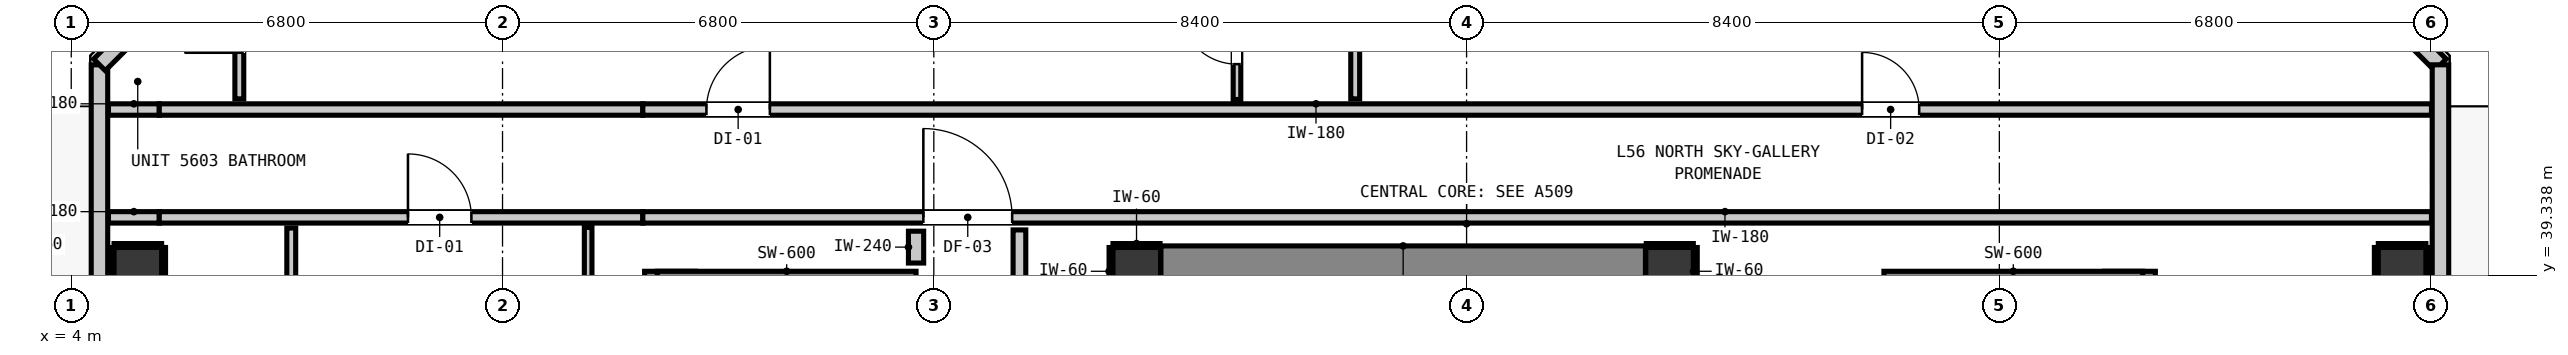
"""IFC4 building model, lengths in metres.
Left out: names, types, materials, properties, quantities, classifications, styles, units other than length and angle.
Written with IfcOpenShell. Run it as: python <this file> out.ifc"""

import sys

from ifc_helpers import new_model, si_unit, direction, frame, frame_2d, origin, origin_2d, place, context, subcontext, project, spatial, rectangle, extrude, element, fill, save


model = new_model("IFC4")
c1 = context("Model", 3, precision=1e-05, world=origin(), true_north=direction((0.0, 1.0)))
c2 = subcontext(c1, "Body", "Model", "MODEL_VIEW")
j1 = project(units=[si_unit("LENGTHUNIT", "METRE"), si_unit("PLANEANGLEUNIT", "RADIAN")], contexts=[c1])
p1 = place(None, origin())
s1 = spatial("IfcSite", under=j1, at=p1, CompositionType="ELEMENT")
p2 = place(p1, origin())
s2 = spatial("IfcBuilding", under=s1, at=p2, CompositionType="ELEMENT")
p3 = place(p2, frame((0.0, 0.0, 193.48)))
s3 = spatial("IfcBuildingStorey", under=s2, at=p3, CompositionType="ELEMENT", Elevation=193.48)
for number, where, z_axis, x_axis in (
    (1, (20.8, 39.4, 0.0), (0.0, 0.0, 1.0), (1.0, 0.0, 0.0)),
    (2, (29.2, 39.4, 0.0), (0.0, 0.0, 1.0), (1.0, 0.0, 0.0)),
):
    element("IfcColumn", number, at=place(p3, frame(where, z_axis=z_axis, x_axis=x_axis)), inside=s3, PredefinedType="COLUMN", context=c2, shape_type="SweptSolid", body=[
        extrude(rectangle(XDim=0.75, YDim=0.75, at=origin_2d()), origin(), (0.0, 0.0, 1.0), 3.32),
    ])
p4 = place(p3, frame((13.44, 31.08, 0.0), z_axis=(0.0, 0.0, 1.0), x_axis=(0.0, 1.0, 0.0)))
e3 = element("IfcWall", 3, at=p4, inside=s3, PredefinedType="SHEAR", context=c2, shape_type="SweptSolid", body=[
    extrude(rectangle(XDim=8.32, YDim=0.8, at=frame_2d((4.16, 0.0))), origin(), (0.0, 0.0, 1.0), 3.32),
])
p5 = place(p3, frame((13.24, 39.1, 0.0), z_axis=(0.0, 0.0, 1.0), x_axis=(1.0, 0.0, 0.0)))
e4 = element("IfcWall", 4, at=p5, inside=s3, PredefinedType="SHEAR", context=c2, shape_type="SweptSolid", body=[
    extrude(rectangle(XDim=4.08, YDim=0.6, at=frame_2d((2.04, 0.0))), origin(), (0.0, 0.0, 1.0), 3.32),
])
p6 = place(p3, frame((36.46, 31.08, 0.0), z_axis=(0.0, 0.0, 1.0), x_axis=(0.0, 1.0, 0.0)))
e5 = element("IfcWall", 5, at=p6, inside=s3, PredefinedType="SHEAR", context=c2, shape_type="SweptSolid", body=[
    extrude(rectangle(XDim=8.32, YDim=0.8, at=frame_2d((4.16, 0.0))), origin(), (0.0, 0.0, 1.0), 3.32),
])
p7 = place(p3, frame((32.58, 39.1, 0.0), z_axis=(0.0, 0.0, 1.0), x_axis=(1.0, 0.0, 0.0)))
e6 = element("IfcWall", 6, at=p7, inside=s3, PredefinedType="SHEAR", context=c2, shape_type="SweptSolid", body=[
    extrude(rectangle(XDim=4.08, YDim=0.6, at=frame_2d((2.04, 0.0))), origin(), (0.0, 0.0, 1.0), 3.32),
])
p8 = place(p3, frame((21.18, 39.4, 0.0), z_axis=(0.0, 0.0, 1.0), x_axis=(1.0, 0.0, 0.0)))
e7 = element("IfcWall", 7, at=p8, inside=s3, PredefinedType="SHEAR", context=c2, shape_type="SweptSolid", body=[
    extrude(rectangle(XDim=7.64, YDim=0.8, at=frame_2d((3.82, 0.0))), origin(), (0.0, 0.0, 1.0), 3.32),
])
for number, where, z_axis, x_axis in (
    (8, (5.05, 39.4, 0.0), (0.0, 0.0, 1.0), (1.0, 0.0, 0.0)),
    (9, (40.75, 39.4, 0.0), (0.0, 0.0, 1.0), (1.0, 0.0, 0.0)),
):
    element("IfcColumn", number, at=place(p3, frame(where, z_axis=z_axis, x_axis=x_axis)), inside=s3, PredefinedType="COLUMN", context=c2, shape_type="SweptSolid", body=[
        extrude(rectangle(XDim=0.75, YDim=0.75, at=origin_2d()), origin(), (0.0, 0.0, 1.0), 3.32),
    ])
p9 = place(p3, frame((4.445, 12.345, 0.0), z_axis=(0.0, 0.0, 1.0), x_axis=(0.0, 1.0, 0.0)))
e10 = element("IfcWall", 10, at=p9, inside=s3, PredefinedType="STANDARD", context=c2, shape_type="SweptSolid", body=[
    extrude(rectangle(XDim=30.31, YDim=0.26, at=frame_2d((15.155, 0.0))), origin(), (0.0, 0.0, 1.0), 3.1),
])
p10 = place(p9, frame((0.91, 0.0, 0.0)))
e11 = element("IfcOpeningElement", 11, at=p10, cuts=e10, PredefinedType="OPENING", context=c2, shape_type="SweptSolid", body=[
    extrude(rectangle(XDim=1.0, YDim=2.15, at=frame_2d((0.5, 1.075))), frame((0.0, 0.14, 0.0), z_axis=(0.0, -1.0, 0.0), x_axis=(1.0, 0.0, 0.0)), (0.0, 0.0, 1.0), 0.28),
])
p11 = place(p9, frame((2.322, 0.0, 0.85)))
e12 = element("IfcOpeningElement", 12, at=p11, cuts=e10, PredefinedType="OPENING", context=c2, shape_type="SweptSolid", body=[
    extrude(rectangle(XDim=0.58, YDim=1.5, at=frame_2d((0.29, 0.75))), frame((0.0, 0.14, 0.0), z_axis=(0.0, -1.0, 0.0), x_axis=(1.0, 0.0, 0.0)), (0.0, 0.0, 1.0), 0.28),
])
for number, where, z_axis, x_axis in (
    (13, (4.445, 42.655, 0.0), (0.0, 0.0, 1.0), (0.707, 0.707, 0.0)),
    (14, (39.255, 44.755, 0.0), (0.0, 0.0, 1.0), (0.707, -0.707, 0.0)),
):
    element("IfcWall", number, at=place(p3, frame(where, z_axis=z_axis, x_axis=x_axis)), inside=s3, PredefinedType="STANDARD", context=c2, shape_type="SweptSolid", body=[
        extrude(rectangle(XDim=2.97, YDim=0.26, at=frame_2d((1.485, 0.0))), origin(), (0.0, 0.0, 1.0), 3.1),
    ])
p12 = place(p3, frame((41.355, 42.655, 0.0), z_axis=(0.0, 0.0, 1.0), x_axis=(0.0, -1.0, 0.0)))
e15 = element("IfcWall", 15, at=p12, inside=s3, PredefinedType="STANDARD", context=c2, shape_type="SweptSolid", body=[
    extrude(rectangle(XDim=30.31, YDim=0.26, at=frame_2d((15.155, 0.0))), origin(), (0.0, 0.0, 1.0), 3.1),
])
p13 = place(p12, frame((23.818, 0.0, 0.0)))
e16 = element("IfcOpeningElement", 16, at=p13, cuts=e15, PredefinedType="OPENING", context=c2, shape_type="SweptSolid", body=[
    extrude(rectangle(XDim=1.0, YDim=2.15, at=frame_2d((0.5, 1.075))), frame((0.0, 0.14, 0.0), z_axis=(0.0, -1.0, 0.0), x_axis=(1.0, 0.0, 0.0)), (0.0, 0.0, 1.0), 0.28),
])
p14 = place(p12, frame((25.332, 0.0, 0.85)))
e17 = element("IfcOpeningElement", 17, at=p14, cuts=e15, PredefinedType="OPENING", context=c2, shape_type="SweptSolid", body=[
    extrude(rectangle(XDim=1.35, YDim=1.85, at=frame_2d((0.675, 0.925))), frame((0.0, 0.14, 0.0), z_axis=(0.0, -1.0, 0.0), x_axis=(1.0, 0.0, 0.0)), (0.0, 0.0, 1.0), 0.28),
])
p15 = place(p12, frame((28.033, 0.0, 0.85)))
e18 = element("IfcOpeningElement", 18, at=p15, cuts=e15, PredefinedType="OPENING", context=c2, shape_type="SweptSolid", body=[
    extrude(rectangle(XDim=1.35, YDim=1.85, at=frame_2d((0.675, 0.925))), frame((0.0, 0.14, 0.0), z_axis=(0.0, -1.0, 0.0), x_axis=(1.0, 0.0, 0.0)), (0.0, 0.0, 1.0), 0.28),
])
p16 = place(p3, frame((4.587, 40.25, 0.0), z_axis=(0.0, 0.0, 1.0), x_axis=(1.0, 0.0, 0.0)))
e19 = element("IfcWall", 19, at=p16, inside=s3, PredefinedType="PARTITIONING", context=c2, shape_type="SweptSolid", body=[
    extrude(rectangle(XDim=0.801, YDim=0.18, at=frame_2d((0.4, 0.0))), origin(), (0.0, 0.0, 1.0), 3.1),
])
p17 = place(p3, frame((5.388, 40.25, 0.0), z_axis=(0.0, 0.0, 1.0), x_axis=(1.0, 0.0, 0.0)))
e20 = element("IfcWall", 20, at=p17, inside=s3, PredefinedType="PARTITIONING", context=c2, shape_type="SweptSolid", body=[
    extrude(rectangle(XDim=7.624, YDim=0.18, at=frame_2d((3.812, 0.0))), origin(), (0.0, 0.0, 1.0), 2.477),
])
p18 = place(p17, frame((3.921, 0.0, 0.0)))
e21 = element("IfcOpeningElement", 21, at=p18, cuts=e20, PredefinedType="OPENING", context=c2, shape_type="SweptSolid", body=[
    extrude(rectangle(XDim=1.0, YDim=2.15, at=frame_2d((0.5, 1.075))), frame((0.0, 0.1, 0.0), z_axis=(0.0, -1.0, 0.0), x_axis=(1.0, 0.0, 0.0)), (0.0, 0.0, 1.0), 0.2),
])
p19 = place(p3, frame((13.012, 40.25, 0.0), z_axis=(0.0, 0.0, 1.0), x_axis=(1.0, 0.0, 0.0)))
e22 = element("IfcWall", 22, at=p19, inside=s3, PredefinedType="PARTITIONING", context=c2, shape_type="SweptSolid", body=[
    extrude(rectangle(XDim=28.201, YDim=0.18, at=frame_2d((14.101, 0.0))), origin(), (0.0, 0.0, 1.0), 3.1),
])
p20 = place(p19, frame((4.423, 0.0, 0.0)))
e23 = element("IfcOpeningElement", 23, at=p20, cuts=e22, PredefinedType="OPENING", context=c2, shape_type="SweptSolid", body=[
    extrude(rectangle(XDim=1.4, YDim=2.15, at=frame_2d((0.7, 1.075))), frame((0.0, 0.1, 0.0), z_axis=(0.0, -1.0, 0.0), x_axis=(1.0, 0.0, 0.0)), (0.0, 0.0, 1.0), 0.2),
])
p21 = place(p3, frame((4.587, 41.95, 0.0), z_axis=(0.0, 0.0, 1.0), x_axis=(1.0, 0.0, 0.0)))
e24 = element("IfcWall", 24, at=p21, inside=s3, PredefinedType="PARTITIONING", context=c2, shape_type="SweptSolid", body=[
    extrude(rectangle(XDim=0.801, YDim=0.18, at=frame_2d((0.4, 0.0))), origin(), (0.0, 0.0, 1.0), 3.1),
])
p22 = place(p3, frame((5.388, 41.95, 0.0), z_axis=(0.0, 0.0, 1.0), x_axis=(1.0, 0.0, 0.0)))
e25 = element("IfcWall", 25, at=p22, inside=s3, PredefinedType="PARTITIONING", context=c2, shape_type="SweptSolid", body=[
    extrude(rectangle(XDim=7.624, YDim=0.18, at=frame_2d((3.812, 0.0))), origin(), (0.0, 0.0, 1.0), 2.477),
])
p23 = place(p3, frame((13.012, 41.95, 0.0), z_axis=(0.0, 0.0, 1.0), x_axis=(1.0, 0.0, 0.0)))
e26 = element("IfcWall", 26, at=p23, inside=s3, PredefinedType="PARTITIONING", context=c2, shape_type="SweptSolid", body=[
    extrude(rectangle(XDim=28.201, YDim=0.18, at=frame_2d((14.101, 0.0))), origin(), (0.0, 0.0, 1.0), 3.1),
])
p24 = place(p23, frame((1.003, 0.0, 0.0)))
e27 = element("IfcOpeningElement", 27, at=p24, cuts=e26, PredefinedType="OPENING", context=c2, shape_type="SweptSolid", body=[
    extrude(rectangle(XDim=1.0, YDim=2.15, at=frame_2d((0.5, 1.075))), frame((0.0, 0.1, 0.0), z_axis=(0.0, -1.0, 0.0), x_axis=(1.0, 0.0, 0.0)), (0.0, 0.0, 1.0), 0.2),
])
p25 = place(p23, frame((19.224, 0.0, 0.0)))
e28 = element("IfcOpeningElement", 28, at=p25, cuts=e26, PredefinedType="OPENING", context=c2, shape_type="SweptSolid", body=[
    extrude(rectangle(XDim=0.9, YDim=2.1, at=frame_2d((0.45, 1.05))), frame((0.0, 0.1, 0.0), z_axis=(0.0, -1.0, 0.0), x_axis=(1.0, 0.0, 0.0)), (0.0, 0.0, 1.0), 0.2),
])
p26 = place(p3, frame((17.32, 39.53, 0.0), z_axis=(0.0, 0.0, 1.0), x_axis=(0.0, 1.0, 0.0)))
e29 = element("IfcWall", 29, at=p26, inside=s3, PredefinedType="PARTITIONING", context=c2, shape_type="SweptSolid", body=[
    extrude(rectangle(XDim=0.502, YDim=0.24, at=frame_2d((0.251, 0.0))), origin(), (0.0, 0.0, 1.0), 3.1),
])
p27 = place(p3, frame((18.95, 38.918, 0.0), z_axis=(0.0, 0.0, 1.0), x_axis=(0.0, 1.0, 0.0)))
e30 = element("IfcWall", 30, at=p27, inside=s3, PredefinedType="PARTITIONING", context=c2, shape_type="SweptSolid", body=[
    extrude(rectangle(XDim=1.134, YDim=0.2, at=frame_2d((0.567, 0.0))), origin(), (0.0, 0.0, 1.0), 3.1),
])
p28 = place(p3, frame((6.65, 42.118, 0.0), z_axis=(0.0, 0.0, 1.0), x_axis=(0.0, 1.0, 0.0)))
e31 = element("IfcWall", 31, at=p28, inside=s3, PredefinedType="PARTITIONING", context=c2, shape_type="SweptSolid", body=[
    extrude(rectangle(XDim=2.495, YDim=0.14, at=frame_2d((1.248, 0.0))), origin(), (0.0, 0.0, 1.0), 3.1),
])
p29 = place(p28, frame((0.727, 0.0, 0.0)))
e32 = element("IfcOpeningElement", 32, at=p29, cuts=e31, PredefinedType="OPENING", context=c2, shape_type="SweptSolid", body=[
    extrude(rectangle(XDim=0.86, YDim=2.02, at=frame_2d((0.43, 1.01))), frame((0.0, 0.08, 0.0), z_axis=(0.0, -1.0, 0.0), x_axis=(1.0, 0.0, 0.0)), (0.0, 0.0, 1.0), 0.16),
])
p30 = place(p3, frame((7.469, 36.635, 0.0), z_axis=(0.0, 0.0, 1.0), x_axis=(0.0, 1.0, 0.0)))
e33 = element("IfcWall", 33, at=p30, inside=s3, PredefinedType="PARTITIONING", context=c2, shape_type="SweptSolid", body=[
    extrude(rectangle(XDim=3.447, YDim=0.14, at=frame_2d((1.724, 0.0))), origin(), (0.0, 0.0, 1.0), 3.1),
])
p31 = place(p30, frame((1.271, 0.0, 0.0)))
e34 = element("IfcOpeningElement", 34, at=p31, cuts=e33, PredefinedType="OPENING", context=c2, shape_type="SweptSolid", body=[
    extrude(rectangle(XDim=0.9, YDim=2.1, at=frame_2d((0.45, 1.05))), frame((0.0, 0.08, 0.0), z_axis=(0.0, -1.0, 0.0), x_axis=(1.0, 0.0, 0.0)), (0.0, 0.0, 1.0), 0.16),
])
p32 = place(p3, frame((24.244, 42.118, 0.0), z_axis=(0.0, 0.0, 1.0), x_axis=(0.0, 1.0, 0.0)))
e35 = element("IfcWall", 35, at=p32, inside=s3, PredefinedType="PARTITIONING", context=c2, shape_type="SweptSolid", body=[
    extrude(rectangle(XDim=2.495, YDim=0.14, at=frame_2d((1.248, 0.0))), origin(), (0.0, 0.0, 1.0), 3.1),
])
p33 = place(p3, frame((12.15, 31.808, 0.0), z_axis=(0.0, 0.0, 1.0), x_axis=(0.0, 1.0, 0.0)))
e36 = element("IfcWall", 36, at=p33, inside=s3, PredefinedType="PARTITIONING", context=c2, shape_type="SweptSolid", body=[
    extrude(rectangle(XDim=8.284, YDim=0.12, at=frame_2d((4.142, 0.0))), origin(), (0.0, 0.0, 1.0), 3.1),
])
p34 = place(p3, frame((22.38, 42.108, 0.0), z_axis=(0.0, 0.0, 1.0), x_axis=(0.0, 1.0, 0.0)))
e37 = element("IfcWall", 37, at=p34, inside=s3, PredefinedType="PARTITIONING", context=c2, shape_type="SweptSolid", body=[
    extrude(rectangle(XDim=2.505, YDim=0.12, at=frame_2d((1.252, 0.0))), origin(), (0.0, 0.0, 1.0), 3.1),
])
p35 = place(p34, frame((0.557, 0.0, 0.0)))
e38 = element("IfcOpeningElement", 38, at=p35, cuts=e37, PredefinedType="OPENING", context=c2, shape_type="SweptSolid", body=[
    extrude(rectangle(XDim=0.9, YDim=2.1, at=frame_2d((0.45, 1.05))), frame((0.0, 0.07, 0.0), z_axis=(0.0, -1.0, 0.0), x_axis=(1.0, 0.0, 0.0)), (0.0, 0.0, 1.0), 0.14),
])
p36 = place(p3, frame((20.425, 39.807, 0.0), z_axis=(0.0, 0.0, 1.0), x_axis=(1.0, 0.0, 0.0)))
e39 = element("IfcWall", 39, at=p36, inside=s3, PredefinedType="PARTITIONING", context=c2, shape_type="SweptSolid", body=[
    extrude(rectangle(XDim=0.742, YDim=0.06, at=frame_2d((0.371, 0.0))), origin(), (0.0, 0.0, 1.0), 1.45),
])
p37 = place(p3, frame((20.393, 39.025, 0.0), z_axis=(0.0, 0.0, 1.0), x_axis=(0.0, 1.0, 0.0)))
e40 = element("IfcWall", 40, at=p37, inside=s3, PredefinedType="PARTITIONING", context=c2, shape_type="SweptSolid", body=[
    extrude(rectangle(XDim=0.75, YDim=0.06, at=frame_2d((0.375, 0.0))), origin(), (0.0, 0.0, 1.0), 1.45),
])
p38 = place(p3, frame((28.833, 39.807, 0.0), z_axis=(0.0, 0.0, 1.0), x_axis=(1.0, 0.0, 0.0)))
e41 = element("IfcWall", 41, at=p38, inside=s3, PredefinedType="PARTITIONING", context=c2, shape_type="SweptSolid", body=[
    extrude(rectangle(XDim=0.742, YDim=0.06, at=frame_2d((0.371, 0.0))), origin(), (0.0, 0.0, 1.0), 1.45),
])
for number, where, z_axis, x_axis in (
    (42, (29.607, 39.025, 0.0), (0.0, 0.0, 1.0), (0.0, 1.0, 0.0)),
    (43, (4.675, 39.807, 0.0), (0.0, 0.0, 1.0), (1.0, 0.0, 0.0)),
    (44, (4.643, 39.025, 0.0), (0.0, 0.0, 1.0), (0.0, 1.0, 0.0)),
    (45, (5.457, 39.025, 0.0), (0.0, 0.0, 1.0), (0.0, 1.0, 0.0)),
    (46, (40.375, 39.807, 0.0), (0.0, 0.0, 1.0), (1.0, 0.0, 0.0)),
    (47, (40.343, 39.025, 0.0), (0.0, 0.0, 1.0), (0.0, 1.0, 0.0)),
    (48, (41.157, 39.025, 0.0), (0.0, 0.0, 1.0), (0.0, 1.0, 0.0)),
):
    element("IfcWall", number, at=place(p3, frame(where, z_axis=z_axis, x_axis=x_axis)), inside=s3, PredefinedType="PARTITIONING", context=c2, shape_type="SweptSolid", body=[
        extrude(rectangle(XDim=0.75, YDim=0.06, at=frame_2d((0.375, 0.0))), origin(), (0.0, 0.0, 1.0), 1.45),
    ])
p39 = place(p20, origin())
e49 = element("IfcDoor", 49, at=p39, inside=s3, OperationType="SINGLE_SWING_LEFT", PredefinedType="DOOR", context=c2, shape_type="SweptSolid", body=[
    extrude(rectangle(XDim=1.4, YDim=2.15, at=frame_2d((0.7, 1.075))), frame((0.0, 0.025, 0.0), z_axis=(0.0, -1.0, 0.0), x_axis=(1.0, 0.0, 0.0)), (0.0, 0.0, 1.0), 0.05),
])
fill(e23, e49)
p40 = place(p24, origin())
e50 = element("IfcDoor", 50, at=p40, inside=s3, OperationType="SINGLE_SWING_RIGHT", PredefinedType="DOOR", context=c2, shape_type="SweptSolid", body=[
    extrude(rectangle(XDim=1.0, YDim=2.15, at=frame_2d((0.5, 1.075))), frame((0.0, 0.025, 0.0), z_axis=(0.0, -1.0, 0.0), x_axis=(1.0, 0.0, 0.0)), (0.0, 0.0, 1.0), 0.05),
])
fill(e27, e50)
p41 = place(p29, origin())
e51 = element("IfcDoor", 51, at=p41, inside=s3, OperationType="SINGLE_SWING_LEFT", PredefinedType="DOOR", context=c2, shape_type="SweptSolid", body=[
    extrude(rectangle(XDim=0.86, YDim=2.02, at=frame_2d((0.43, 1.01))), frame((0.0, 0.025, 0.0), z_axis=(0.0, -1.0, 0.0), x_axis=(1.0, 0.0, 0.0)), (0.0, 0.0, 1.0), 0.05),
])
fill(e32, e51)
p42 = place(p35, origin())
e52 = element("IfcDoor", 52, at=p42, inside=s3, OperationType="SINGLE_SWING_RIGHT", PredefinedType="DOOR", context=c2, shape_type="SweptSolid", body=[
    extrude(rectangle(XDim=0.9, YDim=2.1, at=frame_2d((0.45, 1.05))), frame((0.0, 0.025, 0.0), z_axis=(0.0, -1.0, 0.0), x_axis=(1.0, 0.0, 0.0)), (0.0, 0.0, 1.0), 0.05),
])
fill(e38, e52)
p43 = place(p25, origin())
e53 = element("IfcDoor", 53, at=p43, inside=s3, OperationType="SINGLE_SWING_LEFT", PredefinedType="DOOR", context=c2, shape_type="SweptSolid", body=[
    extrude(rectangle(XDim=0.9, YDim=2.1, at=frame_2d((0.45, 1.05))), frame((0.0, 0.025, 0.0), z_axis=(0.0, -1.0, 0.0), x_axis=(1.0, 0.0, 0.0)), (0.0, 0.0, 1.0), 0.05),
])
fill(e28, e53)
p44 = place(p18, origin())
e54 = element("IfcDoor", 54, at=p44, inside=s3, OperationType="SINGLE_SWING_LEFT", PredefinedType="DOOR", context=c2, shape_type="SweptSolid", body=[
    extrude(rectangle(XDim=1.0, YDim=2.15, at=frame_2d((0.5, 1.075))), frame((0.0, 0.025, 0.0), z_axis=(0.0, -1.0, 0.0), x_axis=(1.0, 0.0, 0.0)), (0.0, 0.0, 1.0), 0.05),
])
fill(e21, e54)
save(model, sys.argv[1])
